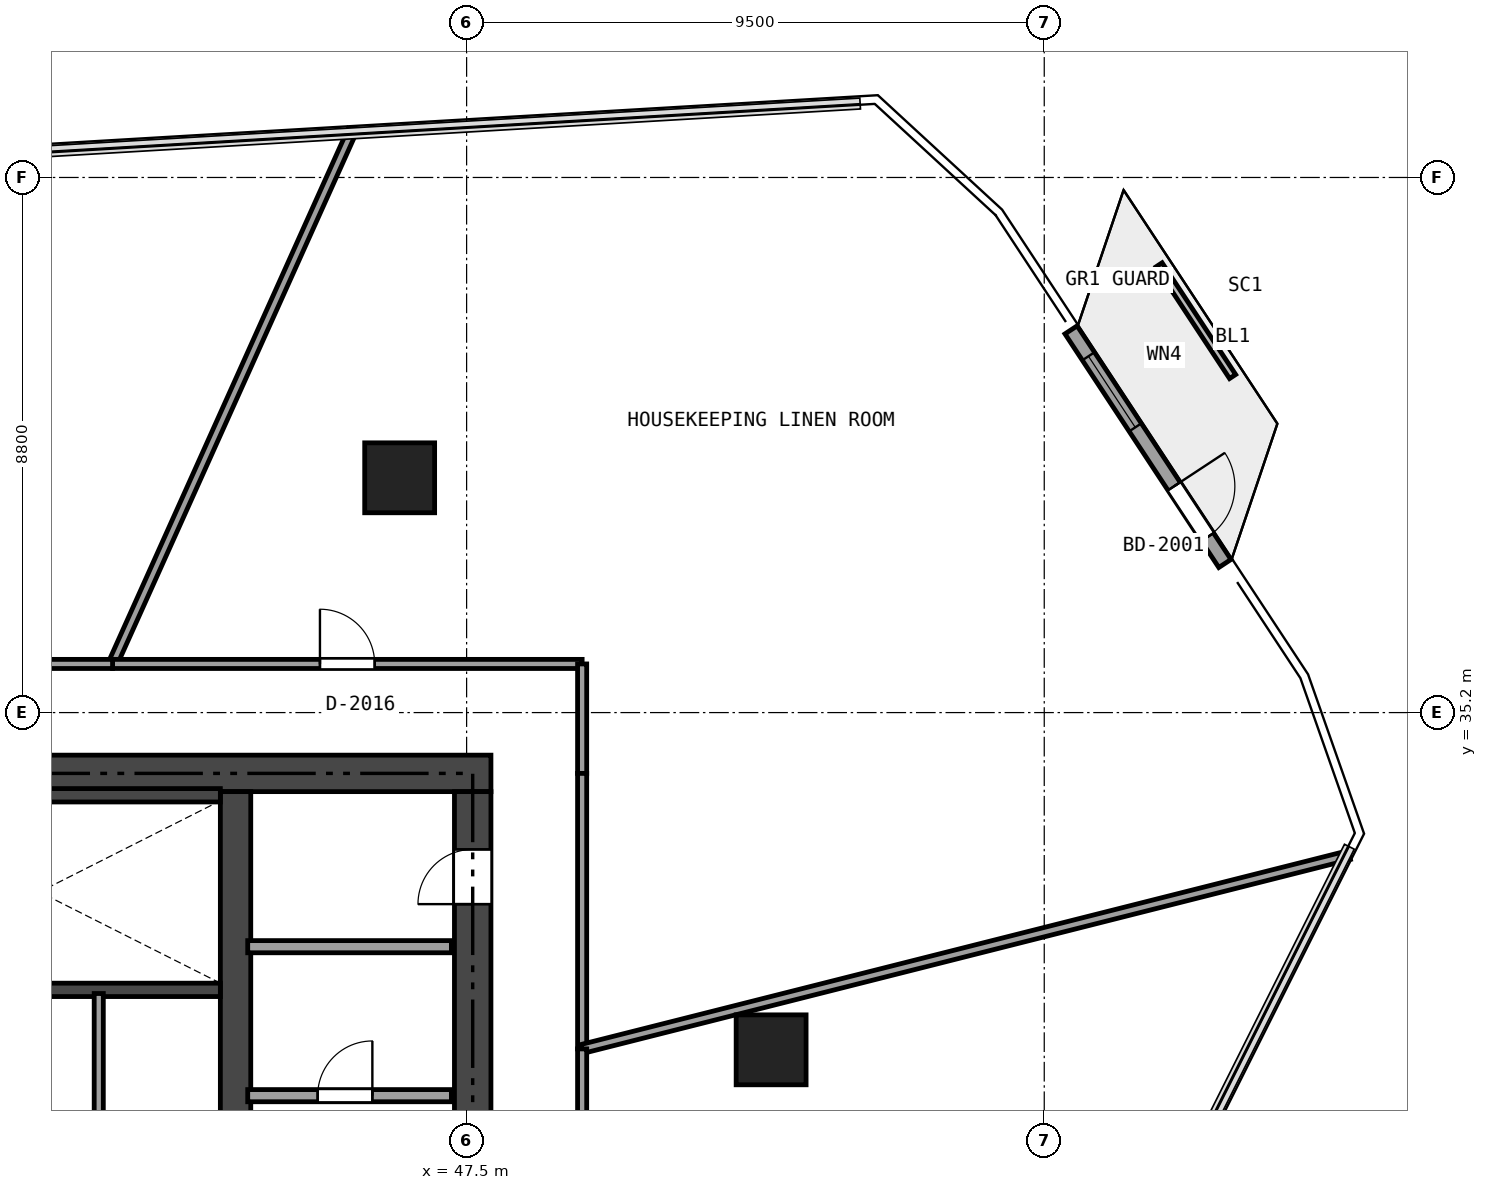
"""IFC4 building model, lengths in metres.
Left out: names, types, materials, properties, quantities, classifications, styles, units other than length and angle.
Written with IfcOpenShell. Run it as: python <this file> out.ifc"""

import sys

from ifc_helpers import new_model, si_unit, direction, frame, frame_2d, origin, origin_2d, place, context, subcontext, project, spatial, rectangle, extrude, element, fill, save


model = new_model("IFC4")
c1 = context("Model", 3, precision=1e-05, world=origin(), true_north=direction((0.0, 1.0)))
c2 = subcontext(c1, "Body", "Model", "MODEL_VIEW")
j1 = project(units=[si_unit("LENGTHUNIT", "METRE"), si_unit("PLANEANGLEUNIT", "RADIAN")], contexts=[c1])
p1 = place(None, origin())
s1 = spatial("IfcSite", under=j1, at=p1, CompositionType="ELEMENT")
p2 = place(p1, origin())
s2 = spatial("IfcBuilding", under=s1, at=p2, CompositionType="ELEMENT")
p3 = place(p2, frame((0.0, 0.0, 79.8)))
s3 = spatial("IfcBuildingStorey", under=s2, at=p3, CompositionType="ELEMENT", Elevation=79.8)
p4 = place(p3, frame((26.5, 34.2, 0.0), z_axis=(0.0, 0.0, 1.0), x_axis=(1.0, 0.0, 0.0)))
e1 = element("IfcWall", 1, at=p4, inside=s3, PredefinedType="SHEAR", context=c2, shape_type="SweptSolid", body=[
    extrude(rectangle(XDim=21.4, YDim=0.6, at=frame_2d((10.7, 0.0))), origin(), (0.0, 0.0, 1.0), 3.17),
])
p5 = place(p4, frame((9.7, 0.0, 0.0)))
e2 = element("IfcOpeningElement", 2, at=p5, cuts=e1, PredefinedType="OPENING", context=c2, shape_type="SweptSolid", body=[
    extrude(rectangle(XDim=1.1, YDim=2.15, at=frame_2d((0.55, 1.075))), frame((0.0, 0.31, 0.0), z_axis=(0.0, -1.0, 0.0), x_axis=(1.0, 0.0, 0.0)), (0.0, 0.0, 1.0), 0.62),
])
p6 = place(p4, frame((1.95, 0.0, 0.0)))
e3 = element("IfcOpeningElement", 3, at=p6, cuts=e1, PredefinedType="OPENING", context=c2, shape_type="SweptSolid", body=[
    extrude(rectangle(XDim=0.9, YDim=2.1, at=frame_2d((0.45, 1.05))), frame((0.0, 0.31, 0.0), z_axis=(0.0, -1.0, 0.0), x_axis=(1.0, 0.0, 0.0)), (0.0, 0.0, 1.0), 0.62),
])
p7 = place(p4, frame((6.25, 0.0, 0.0)))
e4 = element("IfcOpeningElement", 4, at=p7, cuts=e1, PredefinedType="OPENING", context=c2, shape_type="SweptSolid", body=[
    extrude(rectangle(XDim=0.9, YDim=2.1, at=frame_2d((0.45, 1.05))), frame((0.0, 0.31, 0.0), z_axis=(0.0, -1.0, 0.0), x_axis=(1.0, 0.0, 0.0)), (0.0, 0.0, 1.0), 0.62),
])
p8 = place(p3, frame((47.6, 18.9, 0.0), z_axis=(0.0, 0.0, 1.0), x_axis=(0.0, 1.0, 0.0)))
e5 = element("IfcWall", 5, at=p8, inside=s3, PredefinedType="SHEAR", context=c2, shape_type="SweptSolid", body=[
    extrude(rectangle(XDim=15.0, YDim=0.6, at=frame_2d((7.5, 0.0))), origin(), (0.0, 0.0, 1.0), 3.17),
])
p9 = place(p8, frame((6.6, 0.0, 0.0)))
e6 = element("IfcOpeningElement", 6, at=p9, cuts=e5, PredefinedType="OPENING", context=c2, shape_type="SweptSolid", body=[
    extrude(rectangle(XDim=1.1, YDim=2.15, at=frame_2d((0.55, 1.075))), frame((0.0, 0.31, 0.0), z_axis=(0.0, -1.0, 0.0), x_axis=(1.0, 0.0, 0.0)), (0.0, 0.0, 1.0), 0.62),
])
p10 = place(p8, frame((8.5, 0.0, 0.0)))
e7 = element("IfcOpeningElement", 7, at=p10, cuts=e5, PredefinedType="OPENING", context=c2, shape_type="SweptSolid", body=[
    extrude(rectangle(XDim=0.9, YDim=2.1, at=frame_2d((0.45, 1.05))), frame((0.0, 0.31, 0.0), z_axis=(0.0, -1.0, 0.0), x_axis=(1.0, 0.0, 0.0)), (0.0, 0.0, 1.0), 0.62),
])
p11 = place(p8, frame((13.15, 0.0, 0.0)))
e8 = element("IfcOpeningElement", 8, at=p11, cuts=e5, PredefinedType="OPENING", context=c2, shape_type="SweptSolid", body=[
    extrude(rectangle(XDim=0.9, YDim=2.1, at=frame_2d((0.45, 1.05))), frame((0.0, 0.31, 0.0), z_axis=(0.0, -1.0, 0.0), x_axis=(1.0, 0.0, 0.0)), (0.0, 0.0, 1.0), 0.62),
])
p12 = place(p3, frame((43.7, 18.9, 0.0), z_axis=(0.0, 0.0, 1.0), x_axis=(0.0, 1.0, 0.0)))
e9 = element("IfcWall", 9, at=p12, inside=s3, PredefinedType="SHEAR", context=c2, shape_type="SweptSolid", body=[
    extrude(rectangle(XDim=15.0, YDim=0.5, at=frame_2d((7.5, 0.0))), origin(), (0.0, 0.0, 1.0), 3.17),
])
p13 = place(p12, frame((8.1, 0.0, 0.0)))
e10 = element("IfcOpeningElement", 10, at=p13, cuts=e9, PredefinedType="OPENING", context=c2, shape_type="SweptSolid", body=[
    extrude(rectangle(XDim=0.9, YDim=2.1, at=frame_2d((0.45, 1.05))), frame((0.0, 0.26, 0.0), z_axis=(0.0, -1.0, 0.0), x_axis=(1.0, 0.0, 0.0)), (0.0, 0.0, 1.0), 0.52),
])
p14 = place(p3, frame((35.84, 30.64, 0.0), z_axis=(0.0, 0.0, 1.0), x_axis=(1.0, 0.0, 0.0)))
e11 = element("IfcWall", 11, at=p14, inside=s3, PredefinedType="SHEAR", context=c2, shape_type="SweptSolid", body=[
    extrude(rectangle(XDim=7.61, YDim=0.22, at=frame_2d((3.805, 0.0))), origin(), (0.0, 0.0, 1.0), 3.17),
])
p15 = place(p3, frame((37.55, 33.84, 0.0), z_axis=(0.0, 0.0, 1.0), x_axis=(1.0, 0.0, 0.0)))
e12 = element("IfcWall", 12, at=p15, inside=s3, PredefinedType="SHEAR", context=c2, shape_type="SweptSolid", body=[
    extrude(rectangle(XDim=5.9, YDim=0.22, at=frame_2d((2.95, 0.0))), origin(), (0.0, 0.0, 1.0), 3.17),
])
for number, where, z_axis, x_axis in (
    (13, (52.508, 29.654, 0.0), (0.0, 0.0, 1.0), (1.0, 0.0, 0.0)),
    (14, (46.399, 39.061, 0.0), (0.0, 0.0, 1.0), (1.0, 0.0, 0.0)),
):
    element("IfcColumn", number, at=place(p3, frame(where, z_axis=z_axis, x_axis=x_axis)), inside=s3, PredefinedType="COLUMN", context=c2, shape_type="SweptSolid", body=[
        extrude(rectangle(XDim=1.15, YDim=1.15, at=origin_2d()), origin(), (0.0, 0.0, 1.0), 3.17),
    ])
p16 = place(p3, frame((57.441, 41.494, 0.0), z_axis=(0.0, 0.0, 1.0), x_axis=(0.550000501485, -0.83516432417, 0.0)))
e15 = element("IfcWall", 15, at=p16, inside=s3, PredefinedType="SOLIDWALL", context=c2, shape_type="SweptSolid", body=[
    extrude(rectangle(XDim=4.6, YDim=0.24, at=frame_2d((2.3, 0.0))), origin(), (0.0, 0.0, 1.0), 3.17),
])
p17 = place(p16, frame((3.08, 0.0, 0.0)))
e16 = element("IfcOpeningElement", 16, at=p17, cuts=e15, PredefinedType="OPENING", context=c2, shape_type="SweptSolid", body=[
    extrude(rectangle(XDim=1.0, YDim=2.15, at=frame_2d((0.5, 1.075))), frame((0.0, 0.13, 0.0), z_axis=(0.0, -1.0, 0.0), x_axis=(1.0, 0.0, 0.0)), (0.0, 0.0, 1.0), 0.26),
])
p18 = place(p16, frame((0.52, 0.0, 0.2)))
e17 = element("IfcOpeningElement", 17, at=p18, cuts=e15, PredefinedType="OPENING", context=c2, shape_type="SweptSolid", body=[
    extrude(rectangle(XDim=1.4, YDim=1.95, at=frame_2d((0.7, 0.975))), frame((0.0, 0.13, 0.0), z_axis=(0.0, -1.0, 0.0), x_axis=(1.0, 0.0, 0.0)), (0.0, 0.0, 1.0), 0.26),
])
p19 = place(p3, frame((43.9, 28.9, 0.0), z_axis=(0.0, 0.0, 1.0), x_axis=(1.0, 0.0, 0.0)))
e18 = element("IfcWall", 18, at=p19, inside=s3, PredefinedType="SOLIDWALL", context=c2, shape_type="SweptSolid", body=[
    extrude(rectangle(XDim=3.35, YDim=0.2, at=frame_2d((1.675, 0.0))), origin(), (0.0, 0.0, 1.0), 3.17),
])
p20 = place(p19, frame((1.15, 0.0, 0.0)))
e19 = element("IfcOpeningElement", 19, at=p20, cuts=e18, PredefinedType="OPENING", context=c2, shape_type="SweptSolid", body=[
    extrude(rectangle(XDim=0.9, YDim=2.1, at=frame_2d((0.45, 1.05))), frame((0.0, 0.11, 0.0), z_axis=(0.0, -1.0, 0.0), x_axis=(1.0, 0.0, 0.0)), (0.0, 0.0, 1.0), 0.22),
])
p21 = place(p3, frame((43.9, 31.35, 0.0), z_axis=(0.0, 0.0, 1.0), x_axis=(1.0, 0.0, 0.0)))
e20 = element("IfcWall", 20, at=p21, inside=s3, PredefinedType="SOLIDWALL", context=c2, shape_type="SweptSolid", body=[
    extrude(rectangle(XDim=3.35, YDim=0.2, at=frame_2d((1.675, 0.0))), origin(), (0.0, 0.0, 1.0), 3.17),
])
p22 = place(p3, frame((41.45, 28.15, 0.0), z_axis=(0.0, 0.0, 1.0), x_axis=(0.0, 1.0, 0.0)))
e21 = element("IfcWall", 21, at=p22, inside=s3, PredefinedType="PARTITIONING", context=c2, shape_type="SweptSolid", body=[
    extrude(rectangle(XDim=2.43, YDim=0.15, at=frame_2d((1.215, 0.0))), origin(), (0.0, 0.0, 1.0), 3.17),
])
p23 = place(p3, frame((45.622, 44.775, 0.0), z_axis=(0.0, 0.0, 1.0), x_axis=(-0.410050223095, -0.912062944396, 0.0)))
e22 = element("IfcWall", 22, at=p23, inside=s3, PredefinedType="PARTITIONING", context=c2, shape_type="SweptSolid", body=[
    extrude(rectangle(XDim=9.621, YDim=0.15, at=frame_2d((4.811, 0.0))), origin(), (0.0, 0.0, 1.0), 2.455),
])
p24 = place(p3, frame((41.677, 36.0, 0.0), z_axis=(0.0, 0.0, 1.0), x_axis=(1.0, 0.0, 0.0)))
e23 = element("IfcWall", 23, at=p24, inside=s3, PredefinedType="PARTITIONING", context=c2, shape_type="SweptSolid", body=[
    extrude(rectangle(XDim=7.723, YDim=0.15, at=frame_2d((3.861, 0.0))), origin(), (0.0, 0.0, 1.0), 2.455),
])
p25 = place(p24, frame((3.411, 0.0, 0.0)))
e24 = element("IfcOpeningElement", 24, at=p25, cuts=e23, PredefinedType="OPENING", context=c2, shape_type="SweptSolid", body=[
    extrude(rectangle(XDim=0.9, YDim=2.0, at=frame_2d((0.45, 1.0))), frame((0.0, 0.085, 0.0), z_axis=(0.0, -1.0, 0.0), x_axis=(1.0, 0.0, 0.0)), (0.0, 0.0, 1.0), 0.17),
])
p26 = place(p3, frame((49.4, 36.0, 0.0), z_axis=(0.0, 0.0, 1.0), x_axis=(0.0, -1.0, 0.0)))
e25 = element("IfcWall", 25, at=p26, inside=s3, PredefinedType="PARTITIONING", context=c2, shape_type="SweptSolid", body=[
    extrude(rectangle(XDim=1.8, YDim=0.15, at=frame_2d((0.9, 0.0))), origin(), (0.0, 0.0, 1.0), 2.455),
])
p27 = place(p3, frame((49.4, 34.2, 0.0), z_axis=(0.0, 0.0, 1.0), x_axis=(0.0, -1.0, 0.0)))
e26 = element("IfcWall", 26, at=p27, inside=s3, PredefinedType="PARTITIONING", context=c2, shape_type="SweptSolid", body=[
    extrude(rectangle(XDim=4.531, YDim=0.15, at=frame_2d((2.266, 0.0))), origin(), (0.0, 0.0, 1.0), 2.455),
])
p28 = place(p3, frame((49.4, 29.669, 0.0), z_axis=(0.0, 0.0, 1.0), x_axis=(0.969530283496, 0.244971486879, 0.0)))
e27 = element("IfcWall", 27, at=p28, inside=s3, PredefinedType="PARTITIONING", context=c2, shape_type="SweptSolid", body=[
    extrude(rectangle(XDim=13.014, YDim=0.15, at=frame_2d((6.507, 0.0))), origin(), (0.0, 0.0, 1.0), 2.455),
])
p29 = place(p3, frame((32.723, 36.0, 0.0), z_axis=(0.0, 0.0, 1.0), x_axis=(1.0, 0.0, 0.0)))
e28 = element("IfcWall", 28, at=p29, inside=s3, PredefinedType="PARTITIONING", context=c2, shape_type="SweptSolid", body=[
    extrude(rectangle(XDim=8.954, YDim=0.15, at=frame_2d((4.477, 0.0))), origin(), (0.0, 0.0, 1.0), 2.467),
])
p30 = place(p29, frame((4.002, 0.0, 0.0)))
e29 = element("IfcOpeningElement", 29, at=p30, cuts=e28, PredefinedType="OPENING", context=c2, shape_type="SweptSolid", body=[
    extrude(rectangle(XDim=0.95, YDim=2.15, at=frame_2d((0.475, 1.075))), frame((0.0, 0.085, 0.0), z_axis=(0.0, -1.0, 0.0), x_axis=(1.0, 0.0, 0.0)), (0.0, 0.0, 1.0), 0.17),
])
p31 = place(p3, frame((49.4, 29.669, 0.0), z_axis=(0.0, 0.0, 1.0), x_axis=(0.0, -1.0, 0.0)))
e30 = element("IfcWall", 30, at=p31, inside=s3, PredefinedType="PARTITIONING", context=c2, shape_type="SweptSolid", body=[
    extrude(rectangle(XDim=11.069, YDim=0.15, at=frame_2d((5.534, 0.0))), origin(), (0.0, 0.0, 1.0), 2.455),
])
p32 = place(p31, frame((5.06, 0.0, 0.0)))
e31 = element("IfcOpeningElement", 31, at=p32, cuts=e30, PredefinedType="OPENING", context=c2, shape_type="SweptSolid", body=[
    extrude(rectangle(XDim=0.95, YDim=2.15, at=frame_2d((0.475, 1.075))), frame((0.0, 0.085, 0.0), z_axis=(0.0, -1.0, 0.0), x_axis=(1.0, 0.0, 0.0)), (0.0, 0.0, 1.0), 0.17),
])
p33 = place(p17, origin())
e32 = element("IfcDoor", 32, at=p33, inside=s3, OperationType="SINGLE_SWING_LEFT", PredefinedType="DOOR", context=c2, shape_type="SweptSolid", body=[
    extrude(rectangle(XDim=1.0, YDim=2.15, at=frame_2d((0.5, 1.075))), frame((0.0, 0.025, 0.0), z_axis=(0.0, -1.0, 0.0), x_axis=(1.0, 0.0, 0.0)), (0.0, 0.0, 1.0), 0.05),
])
fill(e16, e32)
p34 = place(p18, origin())
e33 = element("IfcWindow", 33, at=p34, inside=s3, PartitioningType="SINGLE_PANEL", PredefinedType="WINDOW", context=c2, shape_type="SweptSolid", body=[
    extrude(rectangle(XDim=1.4, YDim=1.95, at=frame_2d((0.7, 0.975))), frame((0.0, 0.03, 0.0), z_axis=(0.0, -1.0, 0.0), x_axis=(1.0, 0.0, 0.0)), (0.0, 0.0, 1.0), 0.06),
])
fill(e17, e33)
p35 = place(p20, origin())
e34 = element("IfcDoor", 34, at=p35, inside=s3, OperationType="SINGLE_SWING_RIGHT", PredefinedType="DOOR", context=c2, shape_type="SweptSolid", body=[
    extrude(rectangle(XDim=0.9, YDim=2.1, at=frame_2d((0.45, 1.05))), frame((0.0, 0.025, 0.0), z_axis=(0.0, -1.0, 0.0), x_axis=(1.0, 0.0, 0.0)), (0.0, 0.0, 1.0), 0.05),
])
fill(e19, e34)
p36 = place(p11, origin())
e35 = element("IfcDoor", 35, at=p36, inside=s3, OperationType="SINGLE_SWING_LEFT", PredefinedType="DOOR", context=c2, shape_type="SweptSolid", body=[
    extrude(rectangle(XDim=0.9, YDim=2.1, at=frame_2d((0.45, 1.05))), frame((0.0, 0.025, 0.0), z_axis=(0.0, -1.0, 0.0), x_axis=(1.0, 0.0, 0.0)), (0.0, 0.0, 1.0), 0.05),
])
fill(e8, e35)
p37 = place(p25, origin())
e36 = element("IfcDoor", 36, at=p37, inside=s3, OperationType="SINGLE_SWING_LEFT", PredefinedType="DOOR", context=c2, shape_type="SweptSolid", body=[
    extrude(rectangle(XDim=0.9, YDim=2.0, at=frame_2d((0.45, 1.0))), frame((0.0, 0.025, 0.0), z_axis=(0.0, -1.0, 0.0), x_axis=(1.0, 0.0, 0.0)), (0.0, 0.0, 1.0), 0.05),
])
fill(e24, e36)
save(model, sys.argv[1])
